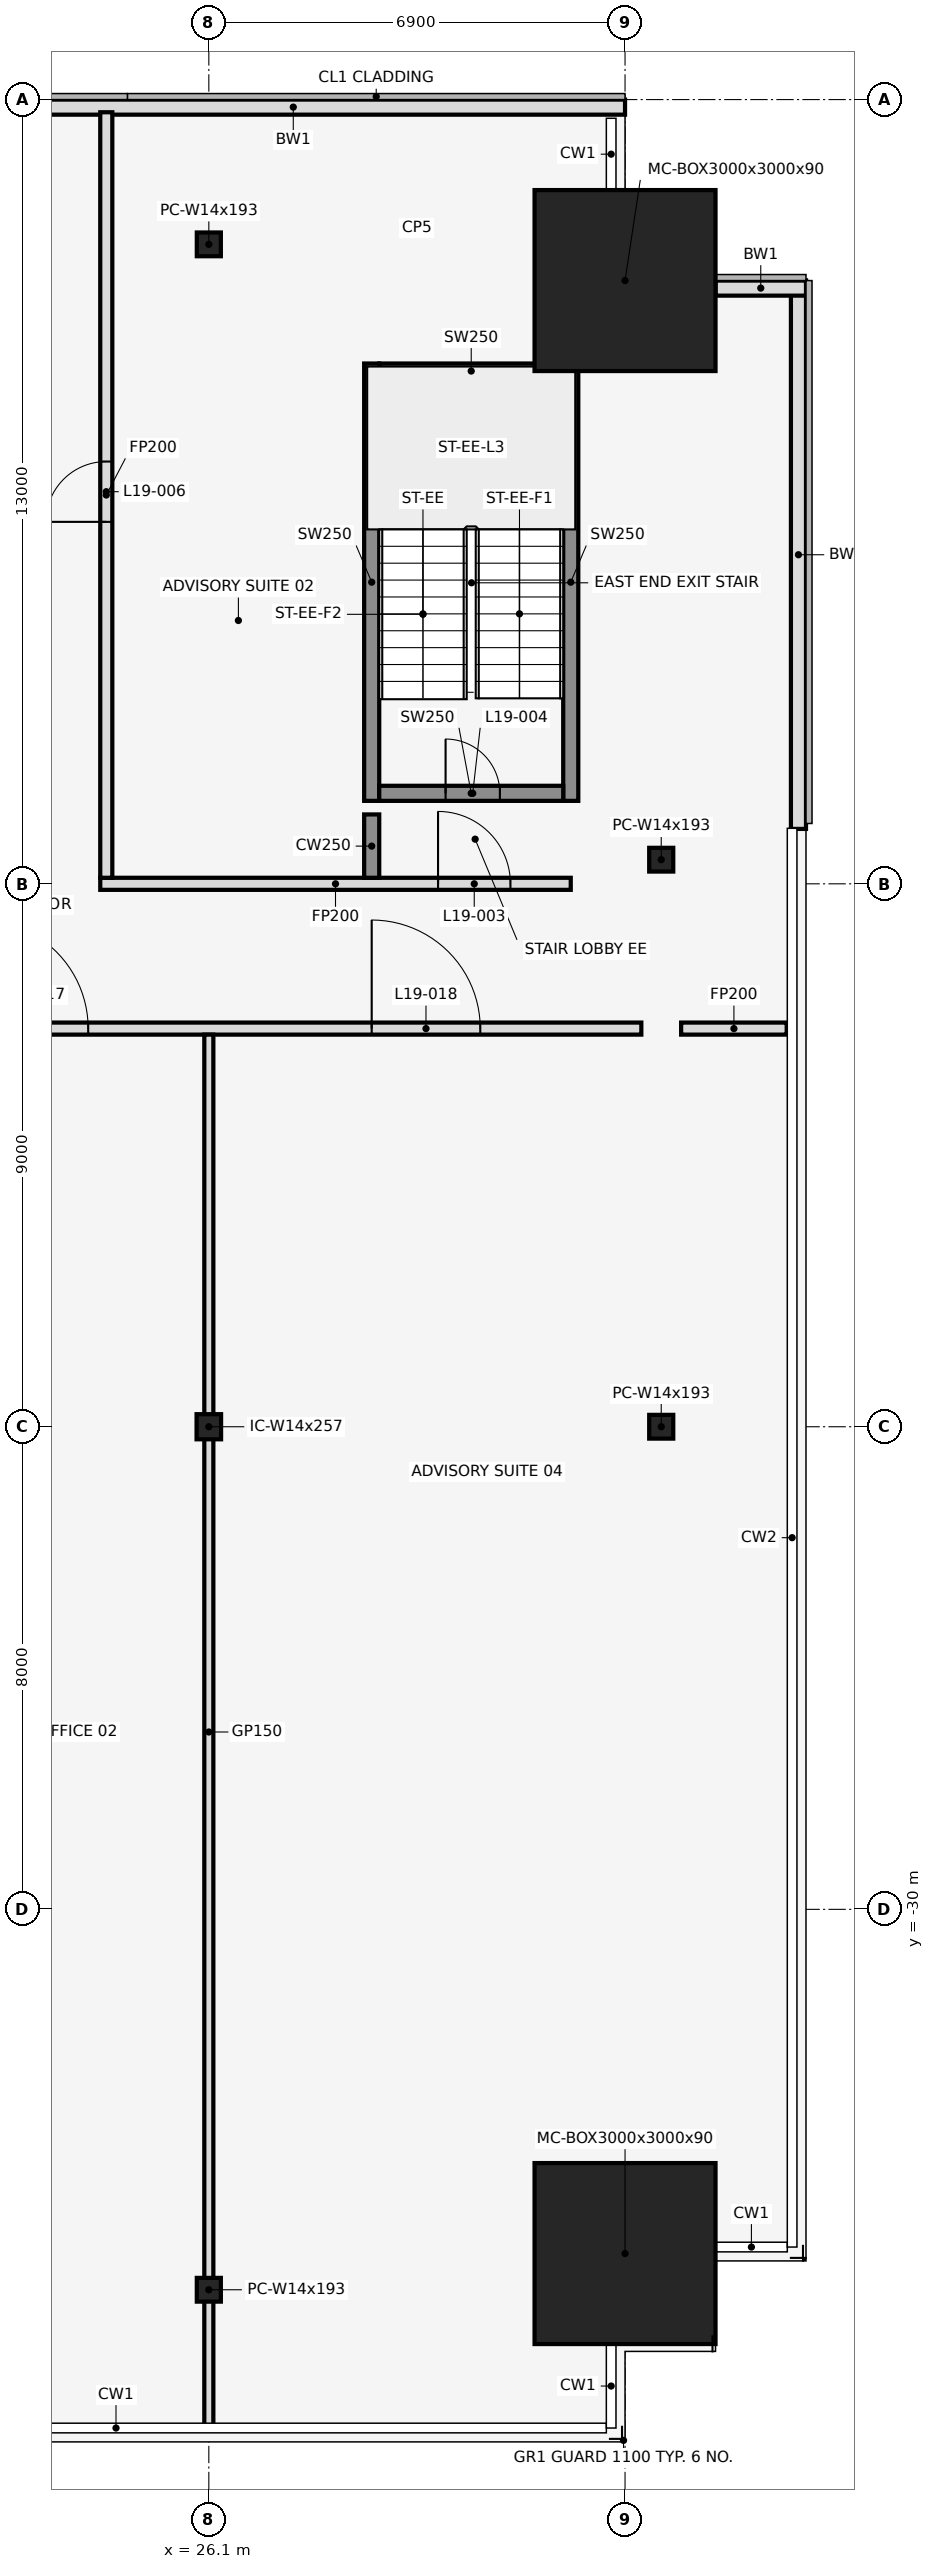
"""IFC4 building model, lengths in metres.
Left out: names, types, materials, properties, quantities, classifications, styles, units other than length and angle.
Written with IfcOpenShell. Run it as: python <this file> out.ifc"""

import sys

from ifc_helpers import new_model, si_unit, direction, frame, frame_2d, origin, origin_2d, place, context, subcontext, project, spatial, rectangle, hollow_rectangle, i_section, extrude, element, fill, save


model = new_model("IFC4")
c1 = context("Model", 3, precision=1e-05, world=origin(), true_north=direction((0.0, 1.0)))
c2 = subcontext(c1, "Body", "Model", "MODEL_VIEW")
j1 = project(units=[si_unit("LENGTHUNIT", "METRE"), si_unit("PLANEANGLEUNIT", "RADIAN")], contexts=[c1])
p1 = place(None, origin())
s1 = spatial("IfcSite", under=j1, at=p1, CompositionType="ELEMENT")
p2 = place(p1, origin())
s2 = spatial("IfcBuilding", under=s1, at=p2, CompositionType="ELEMENT")
p3 = place(p2, frame((0.0, 0.0, 94.0)))
s3 = spatial("IfcBuildingStorey", under=s2, at=p3, CompositionType="ELEMENT", Elevation=94.0)
for number, where, z_axis, x_axis in (
    (1, (26.1, -36.306, 0.0), (0.0, 0.0, 1.0), (1.0, 0.0, 0.0)),
    (2, (26.1, -2.4, 0.0), (0.0, 0.0, 1.0), (1.0, 0.0, 0.0)),
):
    element("IfcColumn", number, at=place(p3, frame(where, z_axis=z_axis, x_axis=x_axis)), inside=s3, PredefinedType="COLUMN", context=c2, shape_type="SweptSolid", body=[
        extrude(i_section(OverallWidth=0.399, OverallDepth=0.394, WebThickness=0.023, FlangeThickness=0.037, at=origin_2d()), origin(), (0.0, 0.0, 1.0), 4.1),
    ])
for number, where, z_axis, x_axis in (
    (3, (33.0, -35.706, 0.0), (0.0, 0.0, 1.0), (1.0, 0.0, 0.0)),
    (4, (33.0, -3.0, 0.0), (0.0, 0.0, 1.0), (1.0, 0.0, 0.0)),
):
    element("IfcColumn", number, at=place(p3, frame(where, z_axis=z_axis, x_axis=x_axis)), inside=s3, PredefinedType="COLUMN", context=c2, shape_type="SweptSolid", body=[
        extrude(hollow_rectangle(XDim=3.0, YDim=3.0, WallThickness=0.09, at=origin_2d()), origin(), (0.0, 0.0, 1.0), 4.1),
    ])
for number, where, z_axis, x_axis in (
    (5, (33.6, -12.6, 0.0), (0.0, 0.0, 1.0), (1.0, 0.0, 0.0)),
    (6, (33.6, -22.0, 0.0), (0.0, 0.0, 1.0), (1.0, 0.0, 0.0)),
):
    element("IfcColumn", number, at=place(p3, frame(where, z_axis=z_axis, x_axis=x_axis)), inside=s3, PredefinedType="COLUMN", context=c2, shape_type="SweptSolid", body=[
        extrude(i_section(OverallWidth=0.399, OverallDepth=0.394, WebThickness=0.023, FlangeThickness=0.037, at=origin_2d()), origin(), (0.0, 0.0, 1.0), 4.1),
    ])
p4 = place(p3, frame((26.1, -22.0, 0.0), z_axis=(0.0, 0.0, 1.0), x_axis=(1.0, 0.0, 0.0)))
e7 = element("IfcColumn", 7, at=p4, inside=s3, PredefinedType="COLUMN", context=c2, shape_type="SweptSolid", body=[
    extrude(i_section(OverallWidth=0.406, OverallDepth=0.417, WebThickness=0.03, FlangeThickness=0.048, at=origin_2d()), origin(), (0.0, 0.0, 1.0), 4.1),
])
p5 = place(p3, frame((33.0, -0.125, 0.0), z_axis=(0.0, 0.0, 1.0), x_axis=(-1.0, 0.0, 0.0)))
e8 = element("IfcWall", 8, at=p5, inside=s3, PredefinedType="STANDARD", context=c2, shape_type="SweptSolid", body=[
    extrude(rectangle(XDim=11.0, YDim=0.25, at=frame_2d((5.5, 0.0))), origin(), (0.0, 0.0, 1.0), 3.95),
])
p6 = place(p3, frame((35.875, -12.09, 0.0), z_axis=(0.0, 0.0, 1.0), x_axis=(0.0, 1.0, 0.0)))
e9 = element("IfcWall", 9, at=p6, inside=s3, PredefinedType="STANDARD", context=c2, shape_type="SweptSolid", body=[
    extrude(rectangle(XDim=9.09, YDim=0.25, at=frame_2d((4.545, 0.0))), origin(), (0.0, 0.0, 1.0), 3.95),
])
p7 = place(p3, frame((36.0, -3.125, 0.0), z_axis=(0.0, 0.0, 1.0), x_axis=(-1.0, 0.0, 0.0)))
e10 = element("IfcWall", 10, at=p7, inside=s3, PredefinedType="STANDARD", context=c2, shape_type="SweptSolid", body=[
    extrude(rectangle(XDim=1.5, YDim=0.25, at=frame_2d((0.75, 0.0))), origin(), (0.0, 0.0, 1.0), 3.95),
])
for number, where, z_axis, x_axis in (
    (11, (28.8, -11.625, 0.0), (0.0, 0.0, 1.0), (0.0, 1.0, 0.0)),
    (12, (32.1, -11.625, 0.0), (0.0, 0.0, 1.0), (0.0, 1.0, 0.0)),
):
    element("IfcWall", number, at=place(p3, frame(where, z_axis=z_axis, x_axis=x_axis)), inside=s3, PredefinedType="SHEAR", context=c2, shape_type="SweptSolid", body=[
        extrude(rectangle(XDim=7.25, YDim=0.25, at=frame_2d((3.625, 0.0))), origin(), (0.0, 0.0, 1.0), 4.1),
    ])
p8 = place(p3, frame((28.925, -11.5, 0.0), z_axis=(0.0, 0.0, 1.0), x_axis=(1.0, 0.0, 0.0)))
e13 = element("IfcWall", 13, at=p8, inside=s3, PredefinedType="SHEAR", context=c2, shape_type="SweptSolid", body=[
    extrude(rectangle(XDim=3.05, YDim=0.25, at=frame_2d((1.525, 0.0))), origin(), (0.0, 0.0, 1.0), 4.1),
])
p9 = place(p8, frame((1.1, 0.0, 0.0)))
e14 = element("IfcOpeningElement", 14, at=p9, cuts=e13, PredefinedType="OPENING", context=c2, shape_type="SweptSolid", body=[
    extrude(rectangle(XDim=0.9, YDim=2.1, at=frame_2d((0.45, 1.05))), frame((0.0, 0.137, 0.0), z_axis=(0.0, -1.0, 0.0), x_axis=(1.0, 0.0, 0.0)), (0.0, 0.0, 1.0), 0.274),
])
p10 = place(p3, frame((28.925, -4.5, 0.0), z_axis=(0.0, 0.0, 1.0), x_axis=(1.0, 0.0, 0.0)))
e15 = element("IfcWall", 15, at=p10, inside=s3, PredefinedType="SHEAR", context=c2, shape_type="SweptSolid", body=[
    extrude(rectangle(XDim=3.05, YDim=0.25, at=frame_2d((1.525, 0.0))), origin(), (0.0, 0.0, 1.0), 4.1),
])
p11 = place(p3, frame((-33.27, -15.4, 0.0), z_axis=(0.0, 0.0, 1.0), x_axis=(1.0, 0.0, 0.0)))
e16 = element("IfcWall", 16, at=p11, inside=s3, PredefinedType="PARTITIONING", context=c2, shape_type="SweptSolid", body=[
    extrude(rectangle(XDim=66.54, YDim=0.2, at=frame_2d((33.27, 0.0))), origin(), (0.0, 0.0, 1.0), 3.018),
])
p12 = place(p11, frame((2.7, 0.0, 0.0)))
e17 = element("IfcOpeningElement", 17, at=p12, cuts=e16, PredefinedType="OPENING", context=c2, shape_type="SweptSolid", body=[
    extrude(rectangle(XDim=1.8, YDim=2.1, at=frame_2d((0.9, 1.05))), frame((0.0, 0.112, 0.0), z_axis=(0.0, -1.0, 0.0), x_axis=(1.0, 0.0, 0.0)), (0.0, 0.0, 1.0), 0.224),
])
p13 = place(p11, frame((11.07, 0.0, 0.0)))
e18 = element("IfcOpeningElement", 18, at=p13, cuts=e16, PredefinedType="OPENING", context=c2, shape_type="SweptSolid", body=[
    extrude(rectangle(XDim=0.9, YDim=2.1, at=frame_2d((0.45, 1.05))), frame((0.0, 0.112, 0.0), z_axis=(0.0, -1.0, 0.0), x_axis=(1.0, 0.0, 0.0)), (0.0, 0.0, 1.0), 0.224),
])
p14 = place(p11, frame((17.87, 0.0, 0.0)))
e19 = element("IfcOpeningElement", 19, at=p14, cuts=e16, PredefinedType="OPENING", context=c2, shape_type="SweptSolid", body=[
    extrude(rectangle(XDim=1.8, YDim=2.1, at=frame_2d((0.9, 1.05))), frame((0.0, 0.112, 0.0), z_axis=(0.0, -1.0, 0.0), x_axis=(1.0, 0.0, 0.0)), (0.0, 0.0, 1.0), 0.224),
])
p15 = place(p11, frame((25.07, 0.0, 0.0)))
e20 = element("IfcOpeningElement", 20, at=p15, cuts=e16, PredefinedType="OPENING", context=c2, shape_type="SweptSolid", body=[
    extrude(rectangle(XDim=1.8, YDim=2.1, at=frame_2d((0.9, 1.05))), frame((0.0, 0.112, 0.0), z_axis=(0.0, -1.0, 0.0), x_axis=(1.0, 0.0, 0.0)), (0.0, 0.0, 1.0), 0.224),
])
p16 = place(p11, frame((35.27, 0.0, 0.0)))
e21 = element("IfcOpeningElement", 21, at=p16, cuts=e16, PredefinedType="OPENING", context=c2, shape_type="SweptSolid", body=[
    extrude(rectangle(XDim=1.8, YDim=2.1, at=frame_2d((0.9, 1.05))), frame((0.0, 0.112, 0.0), z_axis=(0.0, -1.0, 0.0), x_axis=(1.0, 0.0, 0.0)), (0.0, 0.0, 1.0), 0.224),
])
p17 = place(p11, frame((43.97, 0.0, 0.0)))
e22 = element("IfcOpeningElement", 22, at=p17, cuts=e16, PredefinedType="OPENING", context=c2, shape_type="SweptSolid", body=[
    extrude(rectangle(XDim=1.8, YDim=2.1, at=frame_2d((0.9, 1.05))), frame((0.0, 0.112, 0.0), z_axis=(0.0, -1.0, 0.0), x_axis=(1.0, 0.0, 0.0)), (0.0, 0.0, 1.0), 0.224),
])
p18 = place(p11, frame((49.77, 0.0, 0.0)))
e23 = element("IfcOpeningElement", 23, at=p18, cuts=e16, PredefinedType="OPENING", context=c2, shape_type="SweptSolid", body=[
    extrude(rectangle(XDim=1.8, YDim=2.1, at=frame_2d((0.9, 1.05))), frame((0.0, 0.112, 0.0), z_axis=(0.0, -1.0, 0.0), x_axis=(1.0, 0.0, 0.0)), (0.0, 0.0, 1.0), 0.224),
])
p19 = place(p11, frame((55.57, 0.0, 0.0)))
e24 = element("IfcOpeningElement", 24, at=p19, cuts=e16, PredefinedType="OPENING", context=c2, shape_type="SweptSolid", body=[
    extrude(rectangle(XDim=1.8, YDim=2.1, at=frame_2d((0.9, 1.05))), frame((0.0, 0.112, 0.0), z_axis=(0.0, -1.0, 0.0), x_axis=(1.0, 0.0, 0.0)), (0.0, 0.0, 1.0), 0.224),
])
p20 = place(p11, frame((62.07, 0.0, 0.0)))
e25 = element("IfcOpeningElement", 25, at=p20, cuts=e16, PredefinedType="OPENING", context=c2, shape_type="SweptSolid", body=[
    extrude(rectangle(XDim=1.8, YDim=2.1, at=frame_2d((0.9, 1.05))), frame((0.0, 0.112, 0.0), z_axis=(0.0, -1.0, 0.0), x_axis=(1.0, 0.0, 0.0)), (0.0, 0.0, 1.0), 0.224),
])
p21 = place(p3, frame((33.93, -15.4, 0.0), z_axis=(0.0, 0.0, 1.0), x_axis=(1.0, 0.0, 0.0)))
e26 = element("IfcWall", 26, at=p21, inside=s3, PredefinedType="PARTITIONING", context=c2, shape_type="SweptSolid", body=[
    extrude(rectangle(XDim=1.75, YDim=0.2, at=frame_2d((0.875, 0.0))), origin(), (0.0, 0.0, 1.0), 3.018),
])
p22 = place(p3, frame((24.3, -13.0, 0.0), z_axis=(0.0, 0.0, 1.0), x_axis=(1.0, 0.0, 0.0)))
e27 = element("IfcWall", 27, at=p22, inside=s3, PredefinedType="PARTITIONING", context=c2, shape_type="SweptSolid", body=[
    extrude(rectangle(XDim=7.8, YDim=0.2, at=frame_2d((3.9, 0.0))), origin(), (0.0, 0.0, 1.0), 3.018),
])
p23 = place(p22, frame((5.6, 0.0, 0.0)))
e28 = element("IfcOpeningElement", 28, at=p23, cuts=e27, PredefinedType="OPENING", context=c2, shape_type="SweptSolid", body=[
    extrude(rectangle(XDim=1.2, YDim=2.1, at=frame_2d((0.6, 1.05))), frame((0.0, 0.112, 0.0), z_axis=(0.0, -1.0, 0.0), x_axis=(1.0, 0.0, 0.0)), (0.0, 0.0, 1.0), 0.224),
])
p24 = place(p3, frame((24.4, -12.9, 0.0), z_axis=(0.0, 0.0, 1.0), x_axis=(0.0, 1.0, 0.0)))
e29 = element("IfcWall", 29, at=p24, inside=s3, PredefinedType="PARTITIONING", context=c2, shape_type="SweptSolid", body=[
    extrude(rectangle(XDim=12.69, YDim=0.2, at=frame_2d((6.345, 0.0))), origin(), (0.0, 0.0, 1.0), 3.018),
])
p25 = place(p24, frame((5.9, 0.0, 0.0)))
e30 = element("IfcOpeningElement", 30, at=p25, cuts=e29, PredefinedType="OPENING", context=c2, shape_type="SweptSolid", body=[
    extrude(rectangle(XDim=1.0, YDim=2.1, at=frame_2d((0.5, 1.05))), frame((0.0, 0.112, 0.0), z_axis=(0.0, -1.0, 0.0), x_axis=(1.0, 0.0, 0.0)), (0.0, 0.0, 1.0), 0.224),
])
p26 = place(p3, frame((26.1, -38.62, 0.0), z_axis=(0.0, 0.0, 1.0), x_axis=(0.0, 1.0, 0.0)))
e31 = element("IfcWall", 31, at=p26, inside=s3, PredefinedType="PARTITIONING", context=c2, shape_type="SweptSolid", body=[
    extrude(rectangle(XDim=23.12, YDim=0.15, at=frame_2d((11.56, 0.0))), origin(), (0.0, 0.0, 1.0), 3.018),
])
p27 = place(p3, frame((28.8, -12.9, 0.0), z_axis=(0.0, 0.0, 1.0), x_axis=(0.0, 1.0, 0.0)))
e32 = element("IfcWall", 32, at=p27, inside=s3, PredefinedType="SHEAR", context=c2, shape_type="SweptSolid", body=[
    extrude(rectangle(XDim=1.05, YDim=0.25, at=frame_2d((0.525, 0.0))), origin(), (0.0, 0.0, 1.0), 4.1),
])
p28 = place(p23, origin())
e33 = element("IfcDoor", 33, at=p28, inside=s3, OperationType="SINGLE_SWING_RIGHT", PredefinedType="DOOR", context=c2, shape_type="SweptSolid", body=[
    extrude(rectangle(XDim=1.2, YDim=2.1, at=frame_2d((0.6, 1.05))), frame((0.0, 0.025, 0.0), z_axis=(0.0, -1.0, 0.0), x_axis=(1.0, 0.0, 0.0)), (0.0, 0.0, 1.0), 0.05),
])
fill(e28, e33)
p29 = place(p9, origin())
e34 = element("IfcDoor", 34, at=p29, inside=s3, OperationType="SINGLE_SWING_LEFT", PredefinedType="DOOR", context=c2, shape_type="SweptSolid", body=[
    extrude(rectangle(XDim=0.9, YDim=2.1, at=frame_2d((0.45, 1.05))), frame((0.0, 0.025, 0.0), z_axis=(0.0, -1.0, 0.0), x_axis=(1.0, 0.0, 0.0)), (0.0, 0.0, 1.0), 0.05),
])
fill(e14, e34)
p30 = place(p25, frame((1.0, 0.0, 0.0), z_axis=(0.0, 0.0, 1.0), x_axis=(-1.0, 0.0, 0.0)))
e35 = element("IfcDoor", 35, at=p30, inside=s3, OperationType="SINGLE_SWING_RIGHT", PredefinedType="DOOR", context=c2, shape_type="SweptSolid", body=[
    extrude(rectangle(XDim=1.0, YDim=2.1, at=frame_2d((0.5, 1.05))), frame((0.0, 0.025, 0.0), z_axis=(0.0, -1.0, 0.0), x_axis=(1.0, 0.0, 0.0)), (0.0, 0.0, 1.0), 0.05),
])
fill(e30, e35)
p31 = place(p19, origin())
e36 = element("IfcDoor", 36, at=p31, inside=s3, OperationType="SINGLE_SWING_LEFT", PredefinedType="DOOR", context=c2, shape_type="SweptSolid", body=[
    extrude(rectangle(XDim=1.8, YDim=2.1, at=frame_2d((0.9, 1.05))), frame((0.0, 0.025, 0.0), z_axis=(0.0, -1.0, 0.0), x_axis=(1.0, 0.0, 0.0)), (0.0, 0.0, 1.0), 0.05),
])
fill(e24, e36)
p32 = place(p20, origin())
e37 = element("IfcDoor", 37, at=p32, inside=s3, OperationType="SINGLE_SWING_LEFT", PredefinedType="DOOR", context=c2, shape_type="SweptSolid", body=[
    extrude(rectangle(XDim=1.8, YDim=2.1, at=frame_2d((0.9, 1.05))), frame((0.0, 0.025, 0.0), z_axis=(0.0, -1.0, 0.0), x_axis=(1.0, 0.0, 0.0)), (0.0, 0.0, 1.0), 0.05),
])
fill(e25, e37)
save(model, sys.argv[1])
